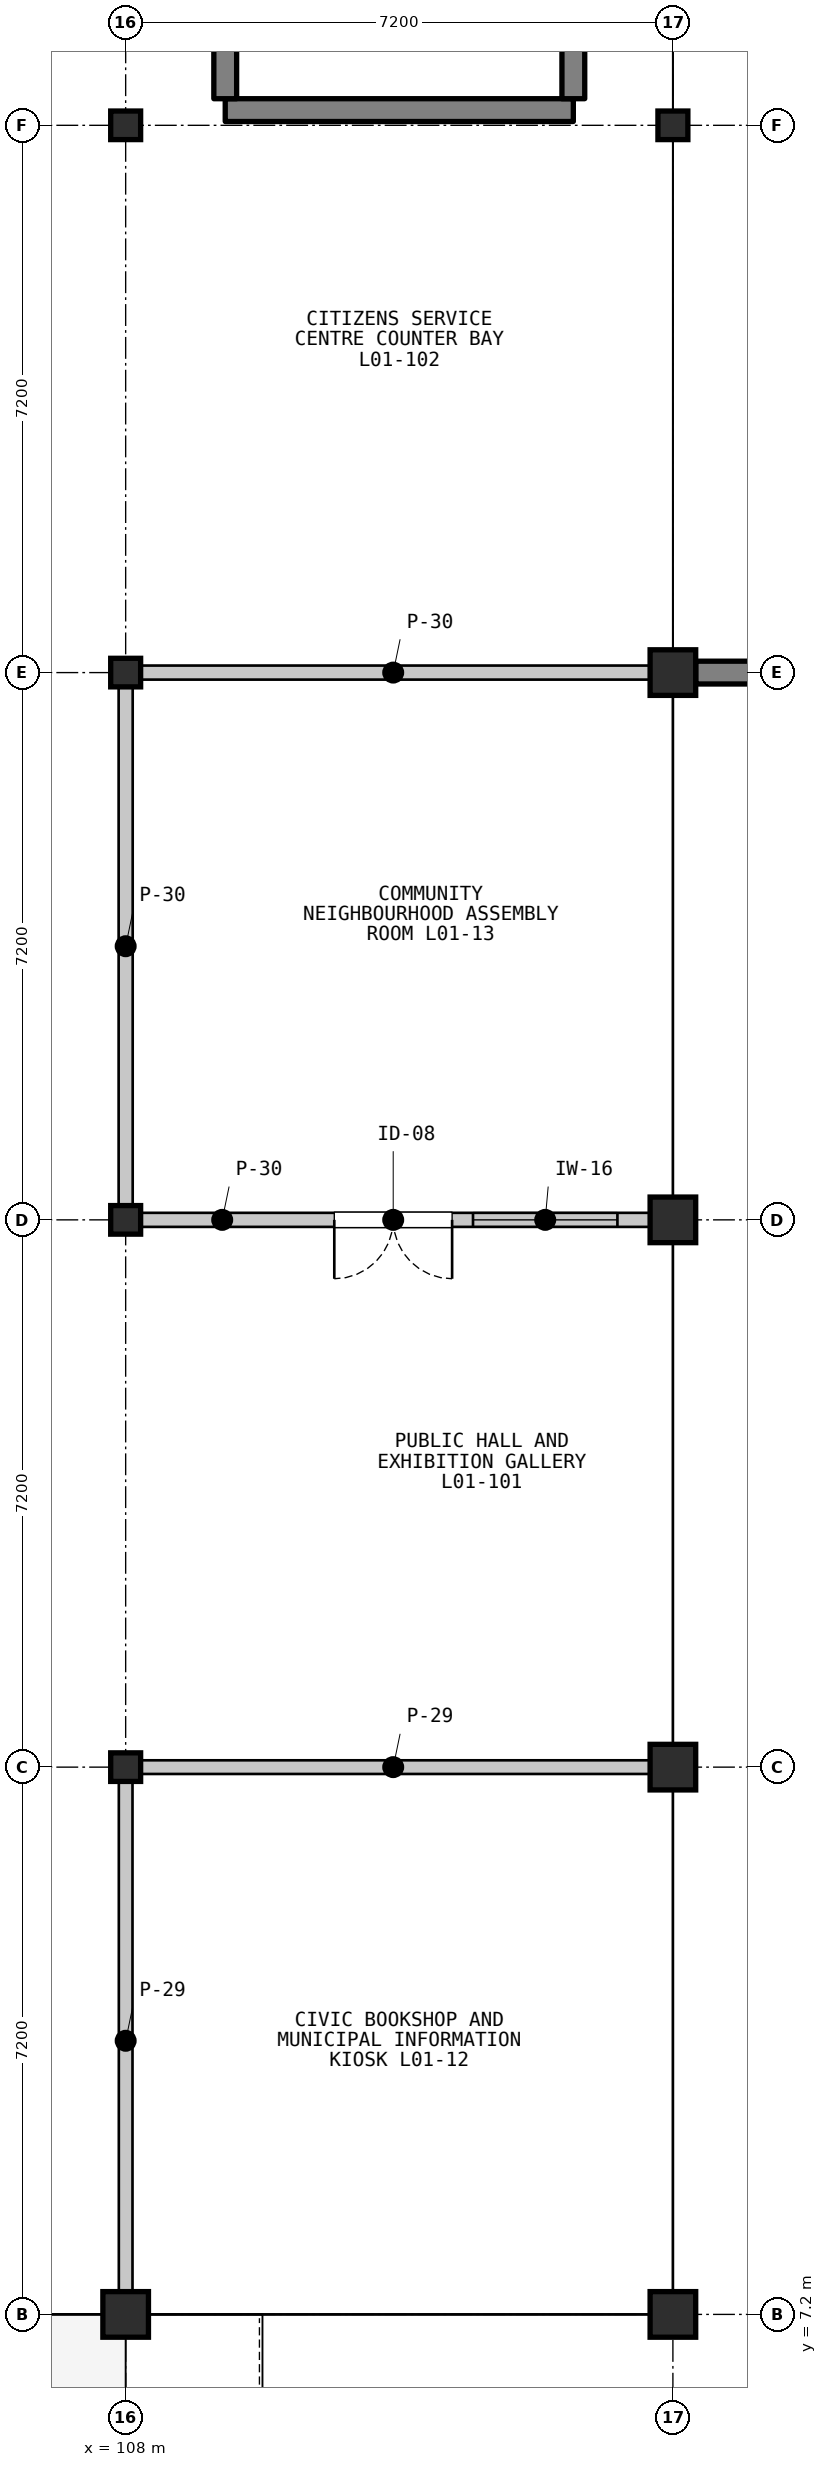
"""IFC4 building model, lengths in metres.
Left out: names, types, materials, properties, quantities, classifications, styles, units other than length and angle.
Written with IfcOpenShell. Run it as: python <this file> out.ifc"""

import sys

from ifc_helpers import new_model, si_unit, direction, frame, frame_2d, origin, origin_2d, place, context, subcontext, project, spatial, rectangle, i_section, extrude, element, fill, save


model = new_model("IFC4")
c1 = context("Model", 3, precision=1e-05, world=origin(), true_north=direction((0.0, 1.0)))
c2 = subcontext(c1, "Body", "Model", "MODEL_VIEW")
j1 = project(units=[si_unit("LENGTHUNIT", "METRE"), si_unit("PLANEANGLEUNIT", "RADIAN")], contexts=[c1])
p1 = place(None, origin())
s1 = spatial("IfcSite", under=j1, at=p1, CompositionType="ELEMENT")
p2 = place(p1, origin())
s2 = spatial("IfcBuilding", under=s1, at=p2, CompositionType="ELEMENT")
p3 = place(p2, origin())
s3 = spatial("IfcBuildingStorey", under=s2, at=p3, CompositionType="ELEMENT", Elevation=0.0)
p4 = place(p3, frame((108.0, 7.2, 0.0), z_axis=(0.0, 0.0, 1.0), x_axis=(1.0, 0.0, 0.0)))
e1 = element("IfcColumn", 1, at=p4, inside=s3, PredefinedType="COLUMN", context=c2, shape_type="SweptSolid", body=[
    extrude(rectangle(XDim=0.6, YDim=0.6, at=origin_2d()), origin(), (0.0, 0.0, 1.0), 5.4),
])
for number, where, z_axis, x_axis in (
    (2, (108.0, 14.4, 0.0), (0.0, 0.0, 1.0), (1.0, 0.0, 0.0)),
    (3, (108.0, 21.6, 0.0), (0.0, 0.0, 1.0), (1.0, 0.0, 0.0)),
    (4, (108.0, 28.8, 0.0), (0.0, 0.0, 1.0), (1.0, 0.0, 0.0)),
    (5, (108.0, 36.0, 0.0), (0.0, 0.0, 1.0), (1.0, 0.0, 0.0)),
):
    element("IfcColumn", number, at=place(p3, frame(where, z_axis=z_axis, x_axis=x_axis)), inside=s3, PredefinedType="COLUMN", context=c2, shape_type="SweptSolid", body=[
        extrude(i_section(OverallWidth=0.394, OverallDepth=0.376, WebThickness=0.017, FlangeThickness=0.028, FilletRadius=0.015, at=origin_2d()), origin(), (0.0, 0.0, 1.0), 5.4),
    ])
for number, where, z_axis, x_axis in (
    (6, (115.2, 7.2, 0.0), (0.0, 0.0, 1.0), (1.0, 0.0, 0.0)),
    (7, (115.2, 14.4, 0.0), (0.0, 0.0, 1.0), (1.0, 0.0, 0.0)),
    (8, (115.2, 21.6, 0.0), (0.0, 0.0, 1.0), (1.0, 0.0, 0.0)),
    (9, (115.2, 28.8, 0.0), (0.0, 0.0, 1.0), (1.0, 0.0, 0.0)),
):
    element("IfcColumn", number, at=place(p3, frame(where, z_axis=z_axis, x_axis=x_axis)), inside=s3, PredefinedType="COLUMN", context=c2, shape_type="SweptSolid", body=[
        extrude(rectangle(XDim=0.6, YDim=0.6, at=origin_2d()), origin(), (0.0, 0.0, 1.0), 5.4),
    ])
p5 = place(p3, frame((115.2, 36.0, 0.0), z_axis=(0.0, 0.0, 1.0), x_axis=(1.0, 0.0, 0.0)))
e10 = element("IfcColumn", 10, at=p5, inside=s3, PredefinedType="COLUMN", context=c2, shape_type="SweptSolid", body=[
    extrude(i_section(OverallWidth=0.394, OverallDepth=0.376, WebThickness=0.017, FlangeThickness=0.028, FilletRadius=0.015, at=origin_2d()), origin(), (0.0, 0.0, 1.0), 5.4),
])
p6 = place(p3, frame((122.1, 28.8, 0.0), z_axis=(0.0, 0.0, 1.0), x_axis=(-1.0, 0.0, 0.0)))
e11 = element("IfcWall", 11, at=p6, inside=s3, PredefinedType="SOLIDWALL", context=c2, shape_type="SweptSolid", body=[
    extrude(rectangle(XDim=6.6, YDim=0.3, at=frame_2d((3.3, 0.0))), origin(), (0.0, 0.0, 1.0), 4.598),
])
p7 = place(p6, frame((0.984, 0.0, 0.95)))
e12 = element("IfcOpeningElement", 12, at=p7, cuts=e11, PredefinedType="OPENING", context=c2, shape_type="SweptSolid", body=[
    extrude(rectangle(XDim=1.2, YDim=1.7, at=frame_2d((0.6, 0.85))), frame((0.0, 0.16, 0.0), z_axis=(0.0, -1.0, 0.0), x_axis=(1.0, 0.0, 0.0)), (0.0, 0.0, 1.0), 0.32),
])
p8 = place(p6, frame((4.416, 0.0, 0.95)))
e13 = element("IfcOpeningElement", 13, at=p8, cuts=e11, PredefinedType="OPENING", context=c2, shape_type="SweptSolid", body=[
    extrude(rectangle(XDim=1.2, YDim=1.7, at=frame_2d((0.6, 0.85))), frame((0.0, 0.16, 0.0), z_axis=(0.0, -1.0, 0.0), x_axis=(1.0, 0.0, 0.0)), (0.0, 0.0, 1.0), 0.32),
])
p9 = place(p3, frame((109.31, 36.2, 0.0), z_axis=(0.0, 0.0, 1.0), x_axis=(1.0, 0.0, 0.0)))
e14 = element("IfcWall", 14, at=p9, inside=s3, PredefinedType="SHEAR", context=c2, shape_type="SweptSolid", body=[
    extrude(rectangle(XDim=4.58, YDim=0.3, at=frame_2d((2.29, 0.0))), origin(), (0.0, 0.0, 1.0), 5.2),
])
for number, where, z_axis, x_axis in (
    (15, (109.31, 36.35, 0.0), (0.0, 0.0, 1.0), (0.0, 1.0, 0.0)),
    (16, (113.89, 36.35, 0.0), (0.0, 0.0, 1.0), (0.0, 1.0, 0.0)),
):
    element("IfcWall", number, at=place(p3, frame(where, z_axis=z_axis, x_axis=x_axis)), inside=s3, PredefinedType="SHEAR", context=c2, shape_type="SweptSolid", body=[
        extrude(rectangle(XDim=9.3, YDim=0.3, at=frame_2d((4.65, 0.0))), origin(), (0.0, 0.0, 1.0), 5.2),
    ])
p10 = place(p3, frame((108.12, 14.4, 0.0), z_axis=(0.0, 0.0, 1.0), x_axis=(1.0, 0.0, 0.0)))
e17 = element("IfcWall", 17, at=p10, inside=s3, PredefinedType="PARTITIONING", context=c2, shape_type="SweptSolid", body=[
    extrude(rectangle(XDim=6.8, YDim=0.18, at=frame_2d((3.4, 0.0))), origin(), (0.0, 0.0, 1.0), 2.035),
])
p11 = place(p3, frame((108.0, 7.32, 0.0), z_axis=(0.0, 0.0, 1.0), x_axis=(0.0, 1.0, 0.0)))
e18 = element("IfcWall", 18, at=p11, inside=s3, PredefinedType="PARTITIONING", context=c2, shape_type="SweptSolid", body=[
    extrude(rectangle(XDim=6.96, YDim=0.18, at=frame_2d((3.48, 0.0))), origin(), (0.0, 0.0, 1.0), 2.035),
])
p12 = place(p3, frame((114.92, 21.6, 0.0), z_axis=(0.0, 0.0, 1.0), x_axis=(-1.0, 0.0, 0.0)))
e19 = element("IfcWall", 19, at=p12, inside=s3, PredefinedType="PARTITIONING", context=c2, shape_type="SweptSolid", body=[
    extrude(rectangle(XDim=6.8, YDim=0.185, at=frame_2d((3.4, 0.0))), origin(), (0.0, 0.0, 1.0), 4.164),
])
p13 = place(p12, frame((2.625, 0.0, 0.0)))
e20 = element("IfcOpeningElement", 20, at=p13, cuts=e19, PredefinedType="OPENING", context=c2, shape_type="SweptSolid", body=[
    extrude(rectangle(XDim=1.55, YDim=2.3, at=frame_2d((0.775, 1.15))), frame((0.0, 0.103, 0.0), z_axis=(0.0, -1.0, 0.0), x_axis=(1.0, 0.0, 0.0)), (0.0, 0.0, 1.0), 0.205),
])
p14 = place(p12, frame((0.45, 0.0, 1.05)))
e21 = element("IfcOpeningElement", 21, at=p14, cuts=e19, PredefinedType="OPENING", context=c2, shape_type="SweptSolid", body=[
    extrude(rectangle(XDim=1.9, YDim=1.22, at=frame_2d((0.95, 0.61))), frame((0.0, 0.103, 0.0), z_axis=(0.0, -1.0, 0.0), x_axis=(1.0, 0.0, 0.0)), (0.0, 0.0, 1.0), 0.205),
])
p15 = place(p3, frame((108.12, 28.8, 0.0), z_axis=(0.0, 0.0, 1.0), x_axis=(1.0, 0.0, 0.0)))
e22 = element("IfcWall", 22, at=p15, inside=s3, PredefinedType="PARTITIONING", context=c2, shape_type="SweptSolid", body=[
    extrude(rectangle(XDim=6.8, YDim=0.185, at=frame_2d((3.4, 0.0))), origin(), (0.0, 0.0, 1.0), 4.588),
])
p16 = place(p3, frame((108.0, 21.72, 0.0), z_axis=(0.0, 0.0, 1.0), x_axis=(0.0, 1.0, 0.0)))
e23 = element("IfcWall", 23, at=p16, inside=s3, PredefinedType="PARTITIONING", context=c2, shape_type="SweptSolid", body=[
    extrude(rectangle(XDim=6.96, YDim=0.185, at=frame_2d((3.48, 0.0))), origin(), (0.0, 0.0, 1.0), 4.588),
])
p17 = place(p13, origin())
e24 = element("IfcDoor", 24, at=p17, inside=s3, OperationType="DOUBLE_DOOR_SINGLE_SWING", PredefinedType="DOOR", context=c2, shape_type="SweptSolid", body=[
    extrude(rectangle(XDim=1.55, YDim=2.3, at=frame_2d((0.775, 1.15))), frame((0.0, 0.025, 0.0), z_axis=(0.0, -1.0, 0.0), x_axis=(1.0, 0.0, 0.0)), (0.0, 0.0, 1.0), 0.05),
])
fill(e20, e24)
p18 = place(p14, origin())
e25 = element("IfcWindow", 25, at=p18, inside=s3, PartitioningType="SINGLE_PANEL", PredefinedType="WINDOW", context=c2, shape_type="SweptSolid", body=[
    extrude(rectangle(XDim=1.9, YDim=1.22, at=frame_2d((0.95, 0.61))), frame((0.0, 0.03, 0.0), z_axis=(0.0, -1.0, 0.0), x_axis=(1.0, 0.0, 0.0)), (0.0, 0.0, 1.0), 0.06),
])
fill(e21, e25)
save(model, sys.argv[1])
